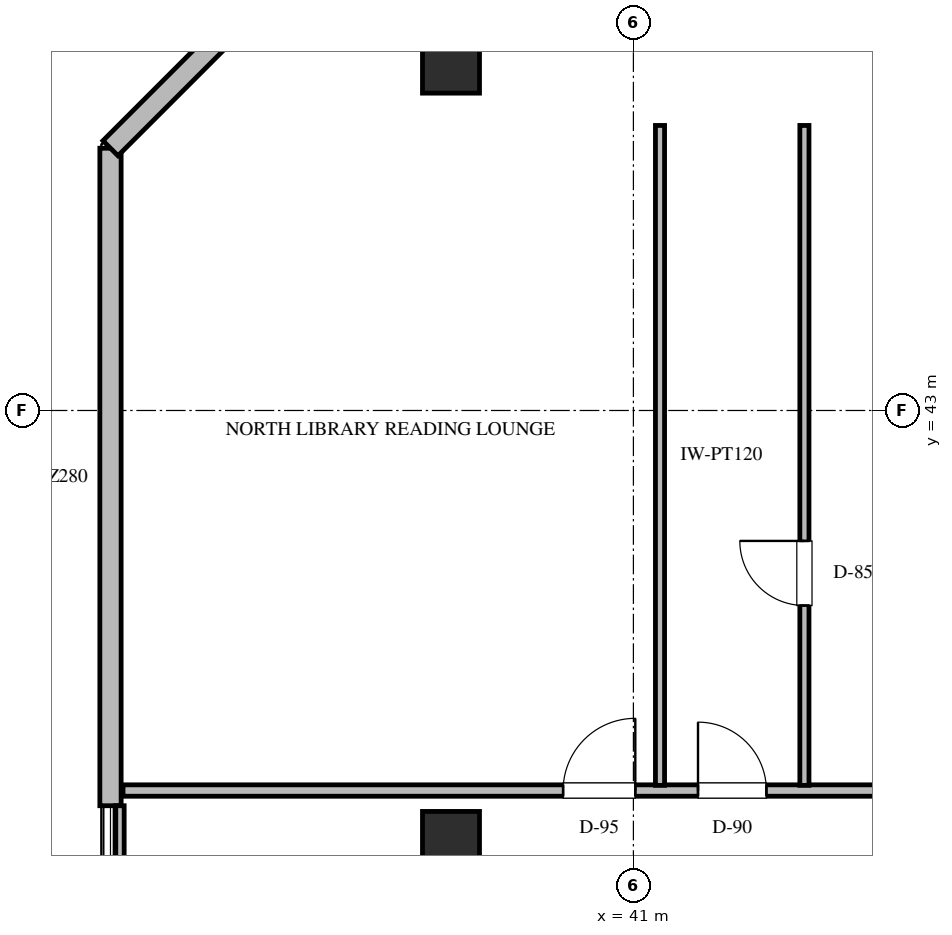
"""IFC4 building model, lengths in metres.
Left out: names, types, materials, properties, quantities, classifications, styles, units other than length and angle.
Written with IfcOpenShell. Run it as: python <this file> out.ifc"""

import sys

from ifc_helpers import new_model, si_unit, direction, frame, frame_2d, origin, origin_2d, place, context, subcontext, project, spatial, rectangle, extrude, element, fill, save


model = new_model("IFC4")
c1 = context("Model", 3, precision=1e-05, world=origin(), true_north=direction((0.0, 1.0)))
c2 = subcontext(c1, "Body", "Model", "MODEL_VIEW")
j1 = project(units=[si_unit("LENGTHUNIT", "METRE"), si_unit("PLANEANGLEUNIT", "RADIAN")], contexts=[c1])
p1 = place(None, origin())
s1 = spatial("IfcSite", under=j1, at=p1, CompositionType="ELEMENT")
p2 = place(p1, origin())
s2 = spatial("IfcBuilding", under=s1, at=p2, CompositionType="ELEMENT")
p3 = place(p2, frame((0.0, 0.0, 311.1)))
s3 = spatial("IfcBuildingStorey", under=s2, at=p3, CompositionType="ELEMENT", Elevation=311.1)
for number, where, z_axis, x_axis in (
    (1, (38.6, 37.35, 0.0), (0.0, 0.0, 1.0), (1.0, 0.0, 0.0)),
    (2, (38.6, 47.55, 0.0), (0.0, 0.0, 1.0), (1.0, 0.0, 0.0)),
):
    element("IfcColumn", number, at=place(p3, frame(where, z_axis=z_axis, x_axis=x_axis)), inside=s3, PredefinedType="COLUMN", context=c2, shape_type="SweptSolid", body=[
        extrude(rectangle(XDim=0.75, YDim=0.75, at=origin_2d()), origin(), (0.0, 0.0, 1.0), 4.5),
    ])
p4 = place(p3, frame((34.12, 37.8, 0.0), z_axis=(0.0, 0.0, 1.0), x_axis=(0.0, 1.0, 0.0)))
e3 = element("IfcWall", 3, at=p4, inside=s3, PredefinedType="STANDARD", context=c2, shape_type="SweptSolid", body=[
    extrude(rectangle(XDim=8.65, YDim=0.28, at=frame_2d((4.325, 0.0))), origin(), (0.0, 0.0, 1.0), 4.22),
])
p5 = place(p3, frame((34.12, 46.45, 0.0), z_axis=(0.0, 0.0, 1.0), x_axis=(0.707106781187, 0.707106781187, 0.0)))
e4 = element("IfcWall", 4, at=p5, inside=s3, PredefinedType="STANDARD", context=c2, shape_type="SweptSolid", body=[
    extrude(rectangle(XDim=2.729, YDim=0.28, at=frame_2d((1.365, 0.0))), origin(), (0.0, 0.0, 1.0), 4.22),
])
p6 = place(p3, frame((34.285, 38.0, 0.0), z_axis=(0.0, 0.0, 1.0), x_axis=(1.0, 0.0, 0.0)))
e5 = element("IfcWall", 5, at=p6, inside=s3, PredefinedType="PARTITIONING", context=c2, shape_type="SweptSolid", body=[
    extrude(rectangle(XDim=10.765, YDim=0.15, at=frame_2d((5.383, 0.0))), origin(), (0.0, 0.0, 1.0), 3.609),
])
p7 = place(p6, frame((5.79, 0.0, 0.0)))
e6 = element("IfcOpeningElement", 6, at=p7, cuts=e5, PredefinedType="OPENING", context=c2, shape_type="SweptSolid", body=[
    extrude(rectangle(XDim=0.95, YDim=2.15, at=frame_2d((0.475, 1.075))), frame((0.0, 0.085, 0.0), z_axis=(0.0, -1.0, 0.0), x_axis=(1.0, 0.0, 0.0)), (0.0, 0.0, 1.0), 0.17),
])
p8 = place(p6, frame((7.565, 0.0, 0.0)))
e7 = element("IfcOpeningElement", 7, at=p8, cuts=e5, PredefinedType="OPENING", context=c2, shape_type="SweptSolid", body=[
    extrude(rectangle(XDim=0.9, YDim=2.1, at=frame_2d((0.45, 1.05))), frame((0.0, 0.085, 0.0), z_axis=(0.0, -1.0, 0.0), x_axis=(1.0, 0.0, 0.0)), (0.0, 0.0, 1.0), 0.17),
])
p9 = place(p3, frame((41.35, 38.068, 0.0), z_axis=(0.0, 0.0, 1.0), x_axis=(0.0, 1.0, 0.0)))
e8 = element("IfcWall", 8, at=p9, inside=s3, PredefinedType="PARTITIONING", context=c2, shape_type="SweptSolid", body=[
    extrude(rectangle(XDim=8.682, YDim=0.12, at=frame_2d((4.341, 0.0))), origin(), (0.0, 0.0, 1.0), 4.22),
])
p10 = place(p3, frame((43.25, 38.068, 0.0), z_axis=(0.0, 0.0, 1.0), x_axis=(0.0, 1.0, 0.0)))
e9 = element("IfcWall", 9, at=p10, inside=s3, PredefinedType="PARTITIONING", context=c2, shape_type="SweptSolid", body=[
    extrude(rectangle(XDim=8.682, YDim=0.12, at=frame_2d((4.341, 0.0))), origin(), (0.0, 0.0, 1.0), 4.22),
])
p11 = place(p10, frame((2.366, 0.0, 0.0)))
e10 = element("IfcOpeningElement", 10, at=p11, cuts=e9, PredefinedType="OPENING", context=c2, shape_type="SweptSolid", body=[
    extrude(rectangle(XDim=0.85, YDim=2.1, at=frame_2d((0.425, 1.05))), frame((0.0, 0.07, 0.0), z_axis=(0.0, -1.0, 0.0), x_axis=(1.0, 0.0, 0.0)), (0.0, 0.0, 1.0), 0.14),
])
p12 = place(p3, frame((34.24, 34.4, 0.0), z_axis=(0.0, 0.0, 1.0), x_axis=(0.0, 1.0, 0.0)))
e11 = element("IfcWall", 11, at=p12, inside=s3, PredefinedType="PARTITIONING", context=c2, shape_type="SweptSolid", body=[
    extrude(rectangle(XDim=3.4, YDim=0.12, at=frame_2d((1.7, 0.0))), origin(), (0.0, 0.0, 1.0), 4.22),
])
p13 = place(p7, origin())
e12 = element("IfcDoor", 12, at=p13, inside=s3, OperationType="SINGLE_SWING_RIGHT", PredefinedType="DOOR", context=c2, shape_type="SweptSolid", body=[
    extrude(rectangle(XDim=0.95, YDim=2.15, at=frame_2d((0.475, 1.075))), frame((0.0, 0.025, 0.0), z_axis=(0.0, -1.0, 0.0), x_axis=(1.0, 0.0, 0.0)), (0.0, 0.0, 1.0), 0.05),
])
fill(e6, e12)
p14 = place(p8, origin())
e13 = element("IfcDoor", 13, at=p14, inside=s3, OperationType="SINGLE_SWING_LEFT", PredefinedType="DOOR", context=c2, shape_type="SweptSolid", body=[
    extrude(rectangle(XDim=0.9, YDim=2.1, at=frame_2d((0.45, 1.05))), frame((0.0, 0.025, 0.0), z_axis=(0.0, -1.0, 0.0), x_axis=(1.0, 0.0, 0.0)), (0.0, 0.0, 1.0), 0.05),
])
fill(e7, e13)
p15 = place(p11, origin())
e14 = element("IfcDoor", 14, at=p15, inside=s3, OperationType="SINGLE_SWING_RIGHT", PredefinedType="DOOR", context=c2, shape_type="SweptSolid", body=[
    extrude(rectangle(XDim=0.85, YDim=2.1, at=frame_2d((0.425, 1.05))), frame((0.0, 0.025, 0.0), z_axis=(0.0, -1.0, 0.0), x_axis=(1.0, 0.0, 0.0)), (0.0, 0.0, 1.0), 0.05),
])
fill(e10, e14)
save(model, sys.argv[1])
